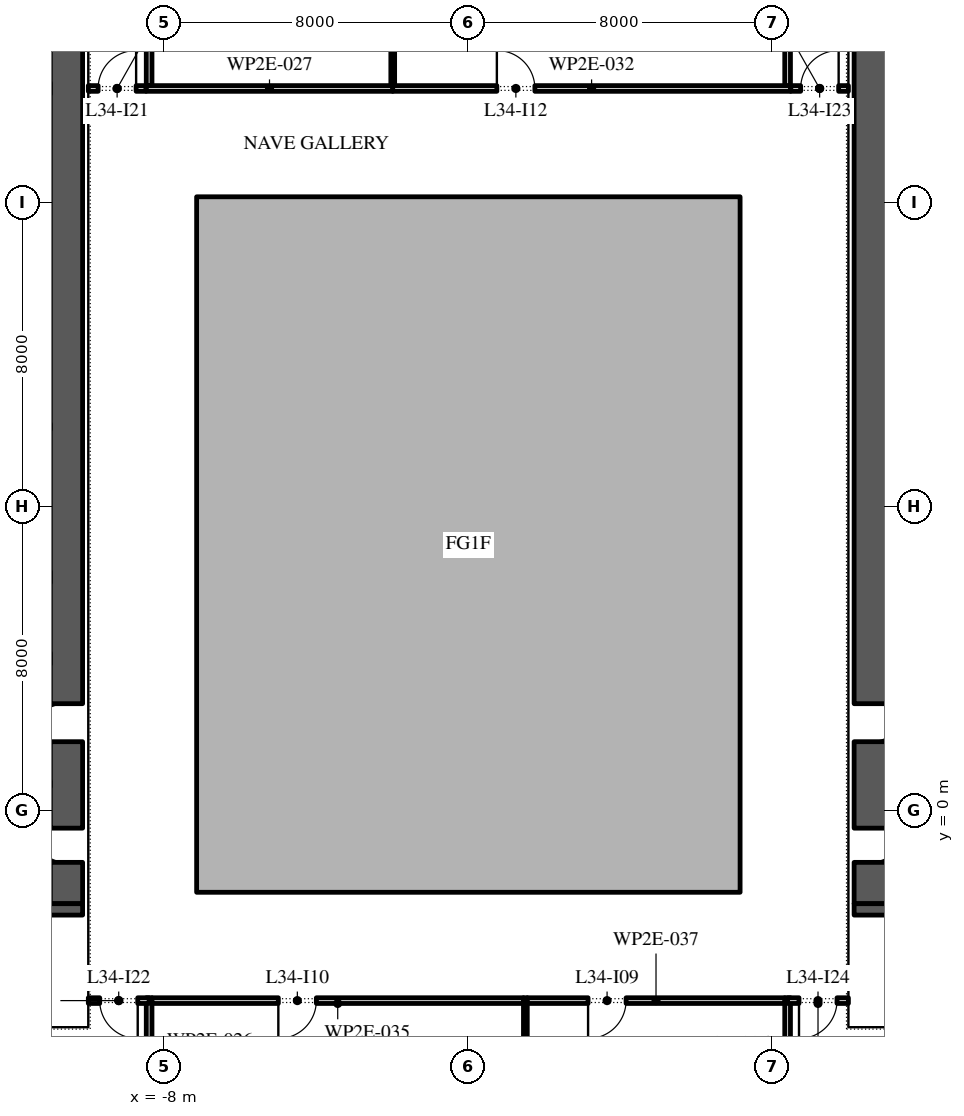
"""IFC4 building model, lengths in metres.
Left out: names, types, materials, properties, quantities, classifications, styles, units other than length and angle.
Written with IfcOpenShell. Run it as: python <this file> out.ifc"""

import sys

from ifc_helpers import new_model, si_unit, direction, frame, frame_2d, origin, place, context, subcontext, project, spatial, polyline, rectangle, outline, extrude, element, fill, save


model = new_model("IFC4")
c1 = context("Model", 3, precision=1e-05, world=origin(), true_north=direction((0.0, 1.0)))
c2 = subcontext(c1, "Body", "Model", "MODEL_VIEW")
j1 = project(units=[si_unit("LENGTHUNIT", "METRE"), si_unit("PLANEANGLEUNIT", "RADIAN")], contexts=[c1])
p1 = place(None, origin())
s1 = spatial("IfcSite", under=j1, at=p1, CompositionType="ELEMENT")
p2 = place(p1, origin())
s2 = spatial("IfcBuilding", under=s1, at=p2, CompositionType="ELEMENT")
p3 = place(p2, frame((0.0, 0.0, 156.0)))
s3 = spatial("IfcBuildingStorey", under=s2, at=p3, CompositionType="ELEMENT", Elevation=156.0)
p4 = place(p3, origin())
e1 = element("IfcWall", 1, at=p4, inside=s3, PredefinedType="STANDARD", context=c2, shape_type="SweptSolid", body=[
    extrude(outline(polyline([(-7.15, -2.15), (7.15, -2.15), (7.15, 16.15), (-7.15, 16.15), (-7.15, -2.15)]), holes=[polyline([(-7.0, -2.0), (-7.0, 16.0), (7.0, 16.0), (7.0, -2.0), (-7.0, -2.0)])]), origin(), (0.0, 0.0, 1.0), 3.9),
])
p5 = place(p3, frame((-10.575, -2.45, 0.0), z_axis=(0.0, 0.0, 1.0), x_axis=(0.0, 1.0, 0.0)))
e2 = element("IfcWall", 2, at=p5, inside=s3, PredefinedType="SHEAR", context=c2, shape_type="SweptSolid", body=[
    extrude(rectangle(XDim=27.9, YDim=0.85, at=frame_2d((13.95, 0.0))), origin(), (0.0, 0.0, 1.0), 3.9),
])
p6 = place(p5, frame((23.65, 0.0, 0.0)))
e3 = element("IfcOpeningElement", 3, at=p6, cuts=e2, PredefinedType="OPENING", context=c2, shape_type="SweptSolid", body=[
    extrude(rectangle(XDim=2.4, YDim=2.1, at=frame_2d((1.2, 1.05))), frame((0.0, 0.435, 0.0), z_axis=(0.0, -1.0, 0.0), x_axis=(1.0, 0.0, 0.0)), (0.0, 0.0, 1.0), 0.87),
])
p7 = place(p5, frame((1.087, 0.0, 0.0)))
e4 = element("IfcOpeningElement", 4, at=p7, cuts=e2, PredefinedType="OPENING", context=c2, shape_type="SweptSolid", body=[
    extrude(rectangle(XDim=0.9, YDim=2.1, at=frame_2d((0.45, 1.05))), frame((0.0, 0.435, 0.0), z_axis=(0.0, -1.0, 0.0), x_axis=(1.0, 0.0, 0.0)), (0.0, 0.0, 1.0), 0.87),
])
p8 = place(p5, frame((4.262, 0.0, 0.0)))
e5 = element("IfcOpeningElement", 5, at=p8, cuts=e2, PredefinedType="OPENING", context=c2, shape_type="SweptSolid", body=[
    extrude(rectangle(XDim=1.0, YDim=2.1, at=frame_2d((0.5, 1.05))), frame((0.0, 0.435, 0.0), z_axis=(0.0, -1.0, 0.0), x_axis=(1.0, 0.0, 0.0)), (0.0, 0.0, 1.0), 0.87),
])
p9 = place(p3, frame((-21.85, -2.6, 0.0), z_axis=(0.0, 0.0, 1.0), x_axis=(1.0, 0.0, 0.0)))
e6 = element("IfcWall", 6, at=p9, inside=s3, PredefinedType="SHEAR", context=c2, shape_type="SweptSolid", body=[
    extrude(rectangle(XDim=11.7, YDim=0.3, at=frame_2d((5.85, 0.0))), origin(), (0.0, 0.0, 1.0), 3.9),
])
p10 = place(p3, frame((10.575, -2.45, 0.0), z_axis=(0.0, 0.0, 1.0), x_axis=(0.0, 1.0, 0.0)))
e7 = element("IfcWall", 7, at=p10, inside=s3, PredefinedType="SHEAR", context=c2, shape_type="SweptSolid", body=[
    extrude(rectangle(XDim=27.9, YDim=0.85, at=frame_2d((13.95, 0.0))), origin(), (0.0, 0.0, 1.0), 3.9),
])
p11 = place(p10, frame((23.65, 0.0, 0.0)))
e8 = element("IfcOpeningElement", 8, at=p11, cuts=e7, PredefinedType="OPENING", context=c2, shape_type="SweptSolid", body=[
    extrude(rectangle(XDim=2.4, YDim=2.1, at=frame_2d((1.2, 1.05))), frame((0.0, 0.435, 0.0), z_axis=(0.0, -1.0, 0.0), x_axis=(1.0, 0.0, 0.0)), (0.0, 0.0, 1.0), 0.87),
])
p12 = place(p10, frame((1.087, 0.0, 0.0)))
e9 = element("IfcOpeningElement", 9, at=p12, cuts=e7, PredefinedType="OPENING", context=c2, shape_type="SweptSolid", body=[
    extrude(rectangle(XDim=0.9, YDim=2.1, at=frame_2d((0.45, 1.05))), frame((0.0, 0.435, 0.0), z_axis=(0.0, -1.0, 0.0), x_axis=(1.0, 0.0, 0.0)), (0.0, 0.0, 1.0), 0.87),
])
p13 = place(p10, frame((4.262, 0.0, 0.0)))
e10 = element("IfcOpeningElement", 10, at=p13, cuts=e7, PredefinedType="OPENING", context=c2, shape_type="SweptSolid", body=[
    extrude(rectangle(XDim=1.0, YDim=2.1, at=frame_2d((0.5, 1.05))), frame((0.0, 0.435, 0.0), z_axis=(0.0, -1.0, 0.0), x_axis=(1.0, 0.0, 0.0)), (0.0, 0.0, 1.0), 0.87),
])
p14 = place(p3, frame((10.15, -2.6, 0.0), z_axis=(0.0, 0.0, 1.0), x_axis=(1.0, 0.0, 0.0)))
e11 = element("IfcWall", 11, at=p14, inside=s3, PredefinedType="SHEAR", context=c2, shape_type="SweptSolid", body=[
    extrude(rectangle(XDim=11.7, YDim=0.3, at=frame_2d((5.85, 0.0))), origin(), (0.0, 0.0, 1.0), 3.9),
])
p15 = place(p3, frame((-8.4, -4.925, 0.0), z_axis=(0.0, 0.0, 1.0), x_axis=(0.0, -1.0, 0.0)))
e12 = element("IfcWall", 12, at=p15, inside=s3, PredefinedType="PARTITIONING", context=c2, shape_type="SweptSolid", body=[
    extrude(rectangle(XDim=2.3, YDim=0.15, at=frame_2d((1.15, 0.0))), origin(), (0.0, 0.0, 1.0), 3.9),
])
p16 = place(p3, frame((-8.475, 19.0, 0.0), z_axis=(0.0, 0.0, 1.0), x_axis=(1.0, 0.0, 0.0)))
e13 = element("IfcWall", 13, at=p16, inside=s3, PredefinedType="PARTITIONING", context=c2, shape_type="SweptSolid", body=[
    extrude(rectangle(XDim=6.485, YDim=0.15, at=frame_2d((3.243, 0.0))), origin(), (0.0, 0.0, 1.0), 3.9),
])
p17 = place(p3, frame((-8.4, 26.975, 0.0), z_axis=(0.0, 0.0, 1.0), x_axis=(0.0, -1.0, 0.0)))
e14 = element("IfcWall", 14, at=p17, inside=s3, PredefinedType="PARTITIONING", context=c2, shape_type="SweptSolid", body=[
    extrude(rectangle(XDim=7.9, YDim=0.15, at=frame_2d((3.95, 0.0))), origin(), (0.0, 0.0, 1.0), 3.9),
])
p18 = place(p17, frame((1.825, 0.0, 0.0)))
e15 = element("IfcOpeningElement", 15, at=p18, cuts=e14, PredefinedType="OPENING", context=c2, shape_type="SweptSolid", body=[
    extrude(rectangle(XDim=1.0, YDim=2.1, at=frame_2d((0.5, 1.05))), frame((0.0, 0.085, 0.0), z_axis=(0.0, -1.0, 0.0), x_axis=(1.0, 0.0, 0.0)), (0.0, 0.0, 1.0), 0.17),
])
p19 = place(p3, frame((-1.99, 19.075, 0.0), z_axis=(0.0, 0.0, 1.0), x_axis=(0.0, 1.0, 0.0)))
e16 = element("IfcWall", 16, at=p19, inside=s3, PredefinedType="PARTITIONING", context=c2, shape_type="SweptSolid", body=[
    extrude(rectangle(XDim=16.909, YDim=0.1, at=frame_2d((8.455, 0.0))), origin(), (0.0, 0.0, 1.0), 3.9),
])
p20 = place(p3, frame((-1.99, 19.0, 0.0), z_axis=(0.0, 0.0, 1.0), x_axis=(1.0, 0.0, 0.0)))
e17 = element("IfcWall", 17, at=p20, inside=s3, PredefinedType="PARTITIONING", context=c2, shape_type="SweptSolid", body=[
    extrude(rectangle(XDim=10.465, YDim=0.15, at=frame_2d((5.232, 0.0))), origin(), (0.0, 0.0, 1.0), 3.9),
])
p21 = place(p20, frame((2.74, 0.0, 0.0)))
e18 = element("IfcOpeningElement", 18, at=p21, cuts=e17, PredefinedType="OPENING", context=c2, shape_type="SweptSolid", body=[
    extrude(rectangle(XDim=1.0, YDim=2.1, at=frame_2d((0.5, 1.05))), frame((0.0, 0.085, 0.0), z_axis=(0.0, -1.0, 0.0), x_axis=(1.0, 0.0, 0.0)), (0.0, 0.0, 1.0), 0.17),
])
p22 = place(p3, frame((1.5, -14.95, 0.0), z_axis=(0.0, 0.0, 1.0), x_axis=(0.0, 1.0, 0.0)))
e19 = element("IfcWall", 19, at=p22, inside=s3, PredefinedType="PARTITIONING", context=c2, shape_type="SweptSolid", body=[
    extrude(rectangle(XDim=10.025, YDim=0.1, at=frame_2d((5.012, 0.0))), origin(), (0.0, 0.0, 1.0), 3.9),
])
p23 = place(p3, frame((1.45, -5.0, 0.0), z_axis=(0.0, 0.0, 1.0), x_axis=(-1.0, 0.0, 0.0)))
e20 = element("IfcWall", 20, at=p23, inside=s3, PredefinedType="PARTITIONING", context=c2, shape_type="SweptSolid", body=[
    extrude(rectangle(XDim=9.775, YDim=0.15, at=frame_2d((4.887, 0.0))), origin(), (0.0, 0.0, 1.0), 3.9),
])
p24 = place(p23, frame((5.45, 0.0, 0.0)))
e21 = element("IfcOpeningElement", 21, at=p24, cuts=e20, PredefinedType="OPENING", context=c2, shape_type="SweptSolid", body=[
    extrude(rectangle(XDim=1.0, YDim=2.1, at=frame_2d((0.5, 1.05))), frame((0.0, 0.085, 0.0), z_axis=(0.0, -1.0, 0.0), x_axis=(1.0, 0.0, 0.0)), (0.0, 0.0, 1.0), 0.17),
])
p25 = place(p3, frame((8.4, -7.375, 0.0), z_axis=(0.0, 0.0, 1.0), x_axis=(0.0, 1.0, 0.0)))
e22 = element("IfcWall", 22, at=p25, inside=s3, PredefinedType="PARTITIONING", context=c2, shape_type="SweptSolid", body=[
    extrude(rectangle(XDim=2.45, YDim=0.15, at=frame_2d((1.225, 0.0))), origin(), (0.0, 0.0, 1.0), 3.9),
])
p26 = place(p3, frame((8.325, -5.0, 0.0), z_axis=(0.0, 0.0, 1.0), x_axis=(-1.0, 0.0, 0.0)))
e23 = element("IfcWall", 23, at=p26, inside=s3, PredefinedType="PARTITIONING", context=c2, shape_type="SweptSolid", body=[
    extrude(rectangle(XDim=6.775, YDim=0.15, at=frame_2d((3.387, 0.0))), origin(), (0.0, 0.0, 1.0), 3.9),
])
p27 = place(p26, frame((4.175, 0.0, 0.0)))
e24 = element("IfcOpeningElement", 24, at=p27, cuts=e23, PredefinedType="OPENING", context=c2, shape_type="SweptSolid", body=[
    extrude(rectangle(XDim=1.0, YDim=2.1, at=frame_2d((0.5, 1.05))), frame((0.0, 0.085, 0.0), z_axis=(0.0, -1.0, 0.0), x_axis=(1.0, 0.0, 0.0)), (0.0, 0.0, 1.0), 0.17),
])
p28 = place(p3, frame((8.4, 19.075, 0.0), z_axis=(0.0, 0.0, 1.0), x_axis=(0.0, 1.0, 0.0)))
e25 = element("IfcWall", 25, at=p28, inside=s3, PredefinedType="PARTITIONING", context=c2, shape_type="SweptSolid", body=[
    extrude(rectangle(XDim=8.05, YDim=0.15, at=frame_2d((4.025, 0.0))), origin(), (0.0, 0.0, 1.0), 3.9),
])
p29 = place(p3, frame((-10.0, 19.0, 0.0), z_axis=(0.0, 0.0, 1.0), x_axis=(1.0, 0.0, 0.0)))
e26 = element("IfcWall", 26, at=p29, inside=s3, PredefinedType="PARTITIONING", context=c2, shape_type="SweptSolid", body=[
    extrude(rectangle(XDim=1.515, YDim=0.15, at=frame_2d((0.757, 0.0))), origin(), (0.0, 0.0, 1.0), 3.9),
])
p30 = place(p29, frame((0.258, 0.0, 0.0)))
e27 = element("IfcOpeningElement", 27, at=p30, cuts=e26, PredefinedType="OPENING", context=c2, shape_type="SweptSolid", body=[
    extrude(rectangle(XDim=1.0, YDim=2.1, at=frame_2d((0.5, 1.05))), frame((0.0, 0.085, 0.0), z_axis=(0.0, -1.0, 0.0), x_axis=(1.0, 0.0, 0.0)), (0.0, 0.0, 1.0), 0.17),
])
p31 = place(p3, frame((-8.4, -5.0, 0.0), z_axis=(0.0, 0.0, 1.0), x_axis=(-1.0, 0.0, 0.0)))
e28 = element("IfcWall", 28, at=p31, inside=s3, PredefinedType="PARTITIONING", context=c2, shape_type="SweptSolid", body=[
    extrude(rectangle(XDim=1.6, YDim=0.15, at=frame_2d((0.8, 0.0))), origin(), (0.0, 0.0, 1.0), 3.9),
])
p32 = place(p31, frame((0.3, 0.0, 0.0)))
e29 = element("IfcOpeningElement", 29, at=p32, cuts=e28, PredefinedType="OPENING", context=c2, shape_type="SweptSolid", body=[
    extrude(rectangle(XDim=1.0, YDim=2.1, at=frame_2d((0.5, 1.05))), frame((0.0, 0.085, 0.0), z_axis=(0.0, -1.0, 0.0), x_axis=(1.0, 0.0, 0.0)), (0.0, 0.0, 1.0), 0.17),
])
p33 = place(p3, frame((8.485, 19.0, 0.0), z_axis=(0.0, 0.0, 1.0), x_axis=(1.0, 0.0, 0.0)))
e30 = element("IfcWall", 30, at=p33, inside=s3, PredefinedType="PARTITIONING", context=c2, shape_type="SweptSolid", body=[
    extrude(rectangle(XDim=1.515, YDim=0.15, at=frame_2d((0.757, 0.0))), origin(), (0.0, 0.0, 1.0), 3.9),
])
p34 = place(p33, frame((0.258, 0.0, 0.0)))
e31 = element("IfcOpeningElement", 31, at=p34, cuts=e30, PredefinedType="OPENING", context=c2, shape_type="SweptSolid", body=[
    extrude(rectangle(XDim=1.0, YDim=2.1, at=frame_2d((0.5, 1.05))), frame((0.0, 0.085, 0.0), z_axis=(0.0, -1.0, 0.0), x_axis=(1.0, 0.0, 0.0)), (0.0, 0.0, 1.0), 0.17),
])
p35 = place(p3, frame((10.0, -5.0, 0.0), z_axis=(0.0, 0.0, 1.0), x_axis=(-1.0, 0.0, 0.0)))
e32 = element("IfcWall", 32, at=p35, inside=s3, PredefinedType="PARTITIONING", context=c2, shape_type="SweptSolid", body=[
    extrude(rectangle(XDim=1.6, YDim=0.15, at=frame_2d((0.8, 0.0))), origin(), (0.0, 0.0, 1.0), 3.9),
])
p36 = place(p35, frame((0.3, 0.0, 0.0)))
e33 = element("IfcOpeningElement", 33, at=p36, cuts=e32, PredefinedType="OPENING", context=c2, shape_type="SweptSolid", body=[
    extrude(rectangle(XDim=1.0, YDim=2.1, at=frame_2d((0.5, 1.05))), frame((0.0, 0.085, 0.0), z_axis=(0.0, -1.0, 0.0), x_axis=(1.0, 0.0, 0.0)), (0.0, 0.0, 1.0), 0.17),
])
p37 = place(p7, origin())
e34 = element("IfcDoor", 34, at=p37, inside=s3, OperationType="SINGLE_SWING_LEFT", PredefinedType="DOOR", context=c2, shape_type="SweptSolid", body=[
    extrude(rectangle(XDim=0.9, YDim=2.1, at=frame_2d((0.45, 1.05))), frame((0.0, 0.425, 0.0), z_axis=(0.0, -1.0, 0.0), x_axis=(1.0, 0.0, 0.0)), (0.0, 0.0, 1.0), 0.05),
])
fill(e4, e34)
p38 = place(p8, origin())
e35 = element("IfcDoor", 35, at=p38, inside=s3, OperationType="SINGLE_SWING_RIGHT", PredefinedType="DOOR", context=c2, shape_type="SweptSolid", body=[
    extrude(rectangle(XDim=1.0, YDim=2.1, at=frame_2d((0.5, 1.05))), frame((0.0, 0.425, 0.0), z_axis=(0.0, -1.0, 0.0), x_axis=(1.0, 0.0, 0.0)), (0.0, 0.0, 1.0), 0.05),
])
fill(e5, e35)
p39 = place(p12, frame((0.9, -0.8, 0.0), z_axis=(0.0, 0.0, 1.0), x_axis=(-1.0, 0.0, 0.0)))
e36 = element("IfcDoor", 36, at=p39, inside=s3, OperationType="SINGLE_SWING_RIGHT", PredefinedType="DOOR", context=c2, shape_type="SweptSolid", body=[
    extrude(rectangle(XDim=0.9, YDim=2.1, at=frame_2d((0.45, 1.05))), frame((0.0, -0.375, 0.0), z_axis=(0.0, -1.0, 0.0), x_axis=(1.0, 0.0, 0.0)), (0.0, 0.0, 1.0), 0.05),
])
fill(e9, e36)
p40 = place(p13, frame((1.0, -0.8, 0.0), z_axis=(0.0, 0.0, 1.0), x_axis=(-1.0, 0.0, 0.0)))
e37 = element("IfcDoor", 37, at=p40, inside=s3, OperationType="SINGLE_SWING_RIGHT", PredefinedType="DOOR", context=c2, shape_type="SweptSolid", body=[
    extrude(rectangle(XDim=1.0, YDim=2.1, at=frame_2d((0.5, 1.05))), frame((0.0, -0.375, 0.0), z_axis=(0.0, -1.0, 0.0), x_axis=(1.0, 0.0, 0.0)), (0.0, 0.0, 1.0), 0.05),
])
fill(e10, e37)
p41 = place(p27, origin())
e38 = element("IfcDoor", 38, at=p41, inside=s3, OperationType="SINGLE_SWING_LEFT", PredefinedType="DOOR", context=c2, shape_type="SweptSolid", body=[
    extrude(rectangle(XDim=1.0, YDim=2.1, at=frame_2d((0.5, 1.05))), frame((0.0, 0.025, 0.0), z_axis=(0.0, -1.0, 0.0), x_axis=(1.0, 0.0, 0.0)), (0.0, 0.0, 1.0), 0.05),
])
fill(e24, e38)
p42 = place(p24, origin())
e39 = element("IfcDoor", 39, at=p42, inside=s3, OperationType="SINGLE_SWING_LEFT", PredefinedType="DOOR", context=c2, shape_type="SweptSolid", body=[
    extrude(rectangle(XDim=1.0, YDim=2.1, at=frame_2d((0.5, 1.05))), frame((0.0, 0.025, 0.0), z_axis=(0.0, -1.0, 0.0), x_axis=(1.0, 0.0, 0.0)), (0.0, 0.0, 1.0), 0.05),
])
fill(e21, e39)
p43 = place(p21, origin())
e40 = element("IfcDoor", 40, at=p43, inside=s3, OperationType="SINGLE_SWING_RIGHT", PredefinedType="DOOR", context=c2, shape_type="SweptSolid", body=[
    extrude(rectangle(XDim=1.0, YDim=2.1, at=frame_2d((0.5, 1.05))), frame((0.0, 0.025, 0.0), z_axis=(0.0, -1.0, 0.0), x_axis=(1.0, 0.0, 0.0)), (0.0, 0.0, 1.0), 0.05),
])
fill(e18, e40)
p44 = place(p30, origin())
e41 = element("IfcDoor", 41, at=p44, inside=s3, OperationType="SINGLE_SWING_LEFT", PredefinedType="DOOR", context=c2, shape_type="SweptSolid", body=[
    extrude(rectangle(XDim=1.0, YDim=2.1, at=frame_2d((0.5, 1.05))), frame((0.0, 0.025, 0.0), z_axis=(0.0, -1.0, 0.0), x_axis=(1.0, 0.0, 0.0)), (0.0, 0.0, 1.0), 0.05),
])
fill(e27, e41)
p45 = place(p32, origin())
e42 = element("IfcDoor", 42, at=p45, inside=s3, OperationType="SINGLE_SWING_RIGHT", PredefinedType="DOOR", context=c2, shape_type="SweptSolid", body=[
    extrude(rectangle(XDim=1.0, YDim=2.1, at=frame_2d((0.5, 1.05))), frame((0.0, 0.025, 0.0), z_axis=(0.0, -1.0, 0.0), x_axis=(1.0, 0.0, 0.0)), (0.0, 0.0, 1.0), 0.05),
])
fill(e29, e42)
p46 = place(p34, origin())
e43 = element("IfcDoor", 43, at=p46, inside=s3, OperationType="SINGLE_SWING_LEFT", PredefinedType="DOOR", context=c2, shape_type="SweptSolid", body=[
    extrude(rectangle(XDim=1.0, YDim=2.1, at=frame_2d((0.5, 1.05))), frame((0.0, 0.025, 0.0), z_axis=(0.0, -1.0, 0.0), x_axis=(1.0, 0.0, 0.0)), (0.0, 0.0, 1.0), 0.05),
])
fill(e31, e43)
p47 = place(p36, origin())
e44 = element("IfcDoor", 44, at=p47, inside=s3, OperationType="SINGLE_SWING_LEFT", PredefinedType="DOOR", context=c2, shape_type="SweptSolid", body=[
    extrude(rectangle(XDim=1.0, YDim=2.1, at=frame_2d((0.5, 1.05))), frame((0.0, 0.025, 0.0), z_axis=(0.0, -1.0, 0.0), x_axis=(1.0, 0.0, 0.0)), (0.0, 0.0, 1.0), 0.05),
])
fill(e33, e44)
save(model, sys.argv[1])
